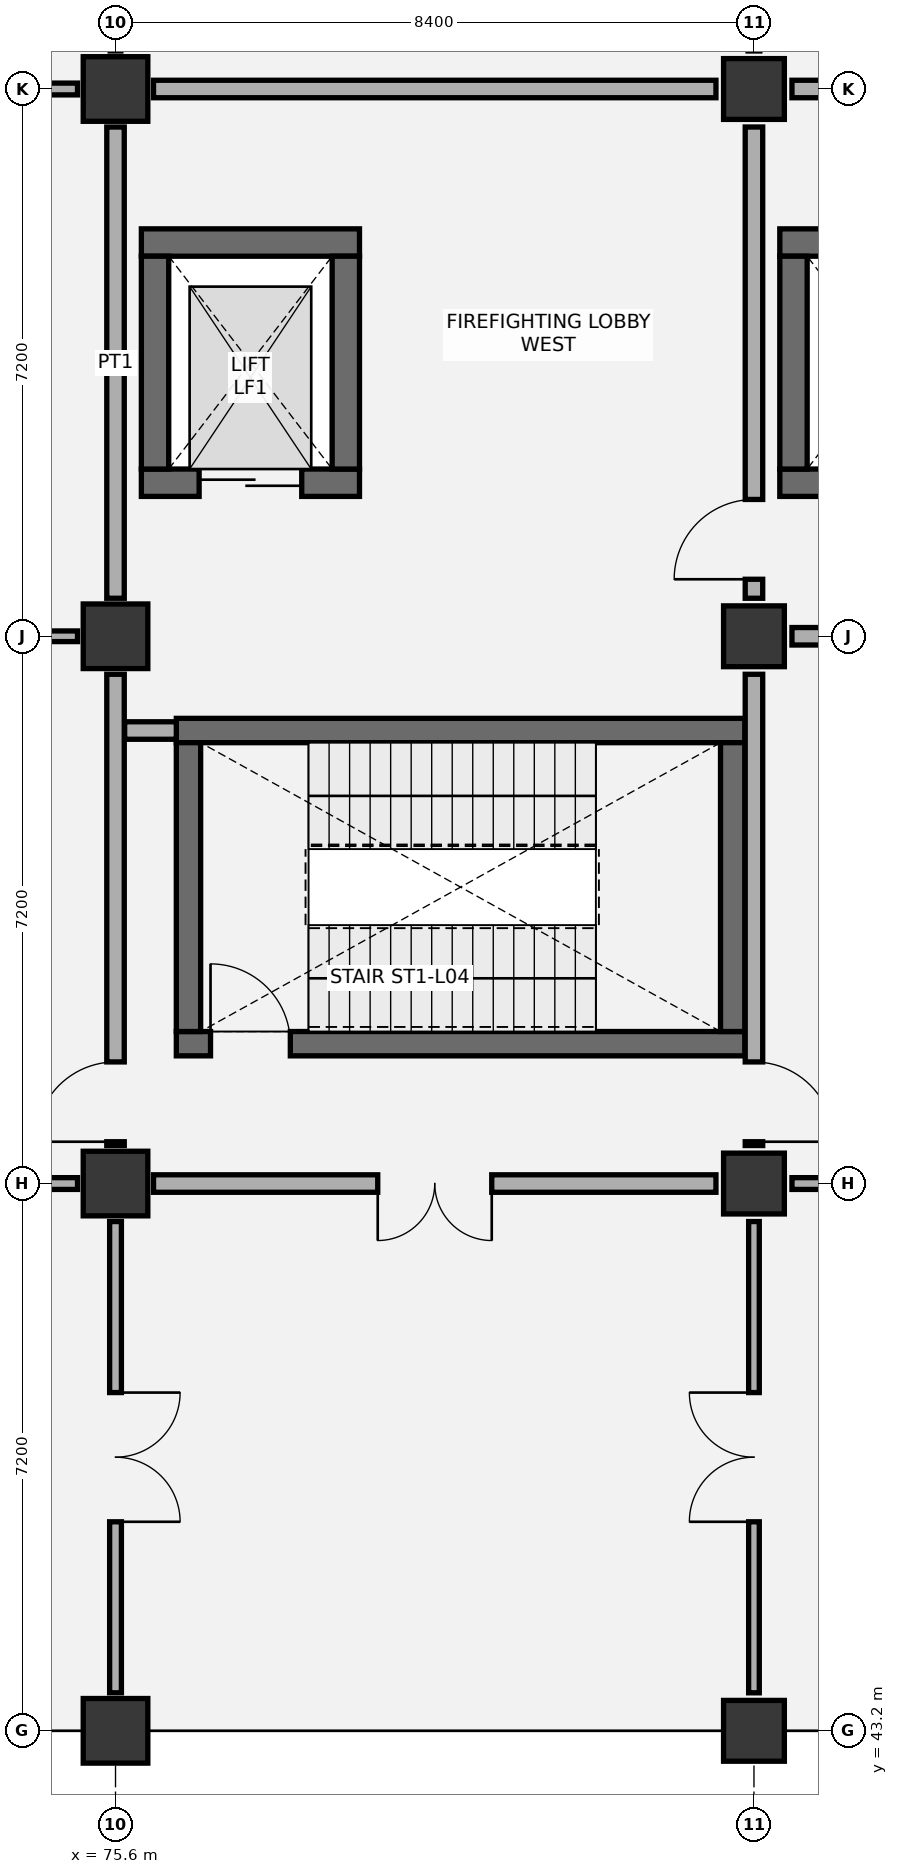
"""IFC4 building model, lengths in metres.
Left out: names, types, materials, properties, quantities, classifications, styles, units other than length and angle.
Written with IfcOpenShell. Run it as: python <this file> out.ifc"""

import sys

from ifc_helpers import new_model, si_unit, direction, frame, frame_2d, origin, origin_2d, place, context, subcontext, project, spatial, rectangle, extrude, element, fill, save


model = new_model("IFC4")
c1 = context("Model", 3, precision=1e-05, world=origin(), true_north=direction((0.0, 1.0)))
c2 = subcontext(c1, "Body", "Model", "MODEL_VIEW")
j1 = project(units=[si_unit("LENGTHUNIT", "METRE"), si_unit("PLANEANGLEUNIT", "RADIAN")], contexts=[c1])
p1 = place(None, origin())
s1 = spatial("IfcSite", under=j1, at=p1, CompositionType="ELEMENT")
p2 = place(p1, origin())
s2 = spatial("IfcBuilding", under=s1, at=p2, CompositionType="ELEMENT")
p3 = place(p2, frame((0.0, 0.0, 22.2)))
s3 = spatial("IfcBuildingStorey", under=s2, at=p3, CompositionType="ELEMENT", Elevation=22.2)
for number, where, z_axis, x_axis in (
    (1, (75.6, 43.2, 0.0), (0.0, 0.0, 1.0), (1.0, 0.0, 0.0)),
    (2, (75.6, 50.4, 0.0), (0.0, 0.0, 1.0), (1.0, 0.0, 0.0)),
    (3, (75.6, 57.6, 0.0), (0.0, 0.0, 1.0), (1.0, 0.0, 0.0)),
    (4, (75.6, 64.8, 0.0), (0.0, 0.0, 1.0), (1.0, 0.0, 0.0)),
):
    element("IfcColumn", number, at=place(p3, frame(where, z_axis=z_axis, x_axis=x_axis)), inside=s3, PredefinedType="COLUMN", context=c2, shape_type="SweptSolid", body=[
        extrude(rectangle(XDim=0.85, YDim=0.85, at=origin_2d()), origin(), (0.0, 0.0, 1.0), 4.8),
    ])
for number, where, z_axis, x_axis in (
    (5, (84.0, 43.2, 0.0), (0.0, 0.0, 1.0), (1.0, 0.0, 0.0)),
    (6, (84.0, 50.4, 0.0), (0.0, 0.0, 1.0), (1.0, 0.0, 0.0)),
    (7, (84.0, 57.6, 0.0), (0.0, 0.0, 1.0), (1.0, 0.0, 0.0)),
    (8, (84.0, 64.8, 0.0), (0.0, 0.0, 1.0), (1.0, 0.0, 0.0)),
):
    element("IfcColumn", number, at=place(p3, frame(where, z_axis=z_axis, x_axis=x_axis)), inside=s3, PredefinedType="COLUMN", context=c2, shape_type="SweptSolid", body=[
        extrude(rectangle(XDim=0.8, YDim=0.8, at=origin_2d()), origin(), (0.0, 0.0, 1.0), 4.8),
    ])
p4 = place(p3, frame((76.4, 52.24, 0.0), z_axis=(0.0, 0.0, 1.0), x_axis=(1.0, 0.0, 0.0)))
e9 = element("IfcWall", 9, at=p4, inside=s3, PredefinedType="SHEAR", context=c2, shape_type="SweptSolid", body=[
    extrude(rectangle(XDim=7.48, YDim=0.32, at=frame_2d((3.74, 0.0))), origin(), (0.0, 0.0, 1.0), 4.52),
])
p5 = place(p4, frame((0.45, 0.0, 0.0)))
e10 = element("IfcOpeningElement", 10, at=p5, cuts=e9, PredefinedType="OPENING", context=c2, shape_type="SweptSolid", body=[
    extrude(rectangle(XDim=1.05, YDim=2.15, at=frame_2d((0.525, 1.075))), frame((0.0, 0.17, 0.0), z_axis=(0.0, -1.0, 0.0), x_axis=(1.0, 0.0, 0.0)), (0.0, 0.0, 1.0), 0.34),
])
p6 = place(p3, frame((76.4, 56.36, 0.0), z_axis=(0.0, 0.0, 1.0), x_axis=(1.0, 0.0, 0.0)))
e11 = element("IfcWall", 11, at=p6, inside=s3, PredefinedType="SHEAR", context=c2, shape_type="SweptSolid", body=[
    extrude(rectangle(XDim=7.48, YDim=0.32, at=frame_2d((3.74, 0.0))), origin(), (0.0, 0.0, 1.0), 4.52),
])
for number, where, z_axis, x_axis in (
    (12, (76.56, 52.4, 0.0), (0.0, 0.0, 1.0), (0.0, 1.0, 0.0)),
    (13, (83.72, 52.4, 0.0), (0.0, 0.0, 1.0), (0.0, 1.0, 0.0)),
):
    element("IfcWall", number, at=place(p3, frame(where, z_axis=z_axis, x_axis=x_axis)), inside=s3, PredefinedType="SHEAR", context=c2, shape_type="SweptSolid", body=[
        extrude(rectangle(XDim=3.8, YDim=0.32, at=frame_2d((1.9, 0.0))), origin(), (0.0, 0.0, 1.0), 4.52),
    ])
p7 = place(p3, frame((75.94, 62.78, 0.0), z_axis=(0.0, 0.0, 1.0), x_axis=(1.0, 0.0, 0.0)))
e14 = element("IfcWall", 14, at=p7, inside=s3, PredefinedType="SHEAR", context=c2, shape_type="SweptSolid", body=[
    extrude(rectangle(XDim=2.87, YDim=0.36, at=frame_2d((1.435, 0.0))), origin(), (0.0, 0.0, 1.0), 4.52),
])
p8 = place(p3, frame((75.94, 59.62, 0.0), z_axis=(0.0, 0.0, 1.0), x_axis=(1.0, 0.0, 0.0)))
e15 = element("IfcWall", 15, at=p8, inside=s3, PredefinedType="SHEAR", context=c2, shape_type="SweptSolid", body=[
    extrude(rectangle(XDim=2.87, YDim=0.36, at=frame_2d((1.435, 0.0))), origin(), (0.0, 0.0, 1.0), 4.52),
])
p9 = place(p8, frame((0.76, 0.0, 0.0)))
e16 = element("IfcOpeningElement", 16, at=p9, cuts=e15, PredefinedType="OPENING", context=c2, shape_type="SweptSolid", body=[
    extrude(rectangle(XDim=1.35, YDim=2.2, at=frame_2d((0.675, 1.1))), frame((0.0, 0.19, 0.0), z_axis=(0.0, -1.0, 0.0), x_axis=(1.0, 0.0, 0.0)), (0.0, 0.0, 1.0), 0.38),
])
for number, where, z_axis, x_axis in (
    (17, (76.12, 59.8, 0.0), (0.0, 0.0, 1.0), (0.0, 1.0, 0.0)),
    (18, (78.63, 59.8, 0.0), (0.0, 0.0, 1.0), (0.0, 1.0, 0.0)),
):
    element("IfcWall", number, at=place(p3, frame(where, z_axis=z_axis, x_axis=x_axis)), inside=s3, PredefinedType="SHEAR", context=c2, shape_type="SweptSolid", body=[
        extrude(rectangle(XDim=2.8, YDim=0.36, at=frame_2d((1.4, 0.0))), origin(), (0.0, 0.0, 1.0), 4.52),
    ])
p10 = place(p3, frame((84.34, 62.78, 0.0), z_axis=(0.0, 0.0, 1.0), x_axis=(1.0, 0.0, 0.0)))
e19 = element("IfcWall", 19, at=p10, inside=s3, PredefinedType="SHEAR", context=c2, shape_type="SweptSolid", body=[
    extrude(rectangle(XDim=7.77, YDim=0.36, at=frame_2d((3.885, 0.0))), origin(), (0.0, 0.0, 1.0), 4.52),
])
p11 = place(p3, frame((84.34, 59.62, 0.0), z_axis=(0.0, 0.0, 1.0), x_axis=(1.0, 0.0, 0.0)))
e20 = element("IfcWall", 20, at=p11, inside=s3, PredefinedType="SHEAR", context=c2, shape_type="SweptSolid", body=[
    extrude(rectangle(XDim=2.66, YDim=0.36, at=frame_2d((1.33, 0.0))), origin(), (0.0, 0.0, 1.0), 4.52),
])
p12 = place(p11, frame((0.78, 0.0, 0.0)))
e21 = element("IfcOpeningElement", 21, at=p12, cuts=e20, PredefinedType="OPENING", context=c2, shape_type="SweptSolid", body=[
    extrude(rectangle(XDim=1.1, YDim=2.15, at=frame_2d((0.55, 1.075))), frame((0.0, 0.19, 0.0), z_axis=(0.0, -1.0, 0.0), x_axis=(1.0, 0.0, 0.0)), (0.0, 0.0, 1.0), 0.38),
])
p13 = place(p3, frame((84.52, 59.8, 0.0), z_axis=(0.0, 0.0, 1.0), x_axis=(0.0, 1.0, 0.0)))
e22 = element("IfcWall", 22, at=p13, inside=s3, PredefinedType="SHEAR", context=c2, shape_type="SweptSolid", body=[
    extrude(rectangle(XDim=2.8, YDim=0.36, at=frame_2d((1.4, 0.0))), origin(), (0.0, 0.0, 1.0), 4.52),
])
p14 = place(p3, frame((75.6, 43.7, 0.0), z_axis=(0.0, 0.0, 1.0), x_axis=(0.0, 1.0, 0.0)))
e23 = element("IfcWall", 23, at=p14, inside=s3, PredefinedType="PARTITIONING", context=c2, shape_type="SweptSolid", body=[
    extrude(rectangle(XDim=6.2, YDim=0.155, at=frame_2d((3.1, 0.0))), origin(), (0.0, 0.0, 1.0), 3.865),
])
p15 = place(p14, frame((2.25, 0.0, 0.0)))
e24 = element("IfcOpeningElement", 24, at=p15, cuts=e23, PredefinedType="OPENING", context=c2, shape_type="SweptSolid", body=[
    extrude(rectangle(XDim=1.7, YDim=2.25, at=frame_2d((0.85, 1.125))), frame((0.0, 0.087, 0.0), z_axis=(0.0, -1.0, 0.0), x_axis=(1.0, 0.0, 0.0)), (0.0, 0.0, 1.0), 0.175),
])
p16 = place(p3, frame((67.7, 50.4, 0.0), z_axis=(0.0, 0.0, 1.0), x_axis=(1.0, 0.0, 0.0)))
e25 = element("IfcWall", 25, at=p16, inside=s3, PredefinedType="PARTITIONING", context=c2, shape_type="SweptSolid", body=[
    extrude(rectangle(XDim=7.4, YDim=0.155, at=frame_2d((3.7, 0.0))), origin(), (0.0, 0.0, 1.0), 3.815),
])
p17 = place(p16, frame((3.0, 0.0, 0.0)))
e26 = element("IfcOpeningElement", 26, at=p17, cuts=e25, PredefinedType="OPENING", context=c2, shape_type="SweptSolid", body=[
    extrude(rectangle(XDim=1.4, YDim=2.15, at=frame_2d((0.7, 1.075))), frame((0.0, 0.087, 0.0), z_axis=(0.0, -1.0, 0.0), x_axis=(1.0, 0.0, 0.0)), (0.0, 0.0, 1.0), 0.175),
])
p18 = place(p3, frame((75.6, 50.9, 0.0), z_axis=(0.0, 0.0, 1.0), x_axis=(0.0, 1.0, 0.0)))
e27 = element("IfcWall", 27, at=p18, inside=s3, PredefinedType="PARTITIONING", context=c2, shape_type="SweptSolid", body=[
    extrude(rectangle(XDim=6.2, YDim=0.23, at=frame_2d((3.1, 0.0))), origin(), (0.0, 0.0, 1.0), 4.225),
])
p19 = place(p18, frame((0.05, 0.0, 0.0)))
e28 = element("IfcOpeningElement", 28, at=p19, cuts=e27, PredefinedType="OPENING", context=c2, shape_type="SweptSolid", body=[
    extrude(rectangle(XDim=1.05, YDim=2.15, at=frame_2d((0.525, 1.075))), frame((0.0, 0.125, 0.0), z_axis=(0.0, -1.0, 0.0), x_axis=(1.0, 0.0, 0.0)), (0.0, 0.0, 1.0), 0.25),
])
p20 = place(p3, frame((67.7, 57.6, 0.0), z_axis=(0.0, 0.0, 1.0), x_axis=(1.0, 0.0, 0.0)))
e29 = element("IfcWall", 29, at=p20, inside=s3, PredefinedType="PARTITIONING", context=c2, shape_type="SweptSolid", body=[
    extrude(rectangle(XDim=7.4, YDim=0.14, at=frame_2d((3.7, 0.0))), origin(), (0.0, 0.0, 1.0), 3.815),
])
p21 = place(p20, frame((3.0, 0.0, 0.0)))
e30 = element("IfcOpeningElement", 30, at=p21, cuts=e29, PredefinedType="OPENING", context=c2, shape_type="SweptSolid", body=[
    extrude(rectangle(XDim=1.4, YDim=2.15, at=frame_2d((0.7, 1.075))), frame((0.0, 0.08, 0.0), z_axis=(0.0, -1.0, 0.0), x_axis=(1.0, 0.0, 0.0)), (0.0, 0.0, 1.0), 0.16),
])
p22 = place(p3, frame((75.6, 58.1, 0.0), z_axis=(0.0, 0.0, 1.0), x_axis=(0.0, 1.0, 0.0)))
e31 = element("IfcWall", 31, at=p22, inside=s3, PredefinedType="PARTITIONING", context=c2, shape_type="SweptSolid", body=[
    extrude(rectangle(XDim=6.2, YDim=0.23, at=frame_2d((3.1, 0.0))), origin(), (0.0, 0.0, 1.0), 3.865),
])
p23 = place(p3, frame((67.7, 64.8, 0.0), z_axis=(0.0, 0.0, 1.0), x_axis=(1.0, 0.0, 0.0)))
e32 = element("IfcWall", 32, at=p23, inside=s3, PredefinedType="PARTITIONING", context=c2, shape_type="SweptSolid", body=[
    extrude(rectangle(XDim=7.4, YDim=0.155, at=frame_2d((3.7, 0.0))), origin(), (0.0, 0.0, 1.0), 3.815),
])
p24 = place(p23, frame((2.85, 0.0, 0.0)))
e33 = element("IfcOpeningElement", 33, at=p24, cuts=e32, PredefinedType="OPENING", context=c2, shape_type="SweptSolid", body=[
    extrude(rectangle(XDim=1.7, YDim=2.25, at=frame_2d((0.85, 1.125))), frame((0.0, 0.087, 0.0), z_axis=(0.0, -1.0, 0.0), x_axis=(1.0, 0.0, 0.0)), (0.0, 0.0, 1.0), 0.175),
])
p25 = place(p3, frame((84.0, 43.7, 0.0), z_axis=(0.0, 0.0, 1.0), x_axis=(0.0, 1.0, 0.0)))
e34 = element("IfcWall", 34, at=p25, inside=s3, PredefinedType="PARTITIONING", context=c2, shape_type="SweptSolid", body=[
    extrude(rectangle(XDim=6.2, YDim=0.14, at=frame_2d((3.1, 0.0))), origin(), (0.0, 0.0, 1.0), 4.225),
])
p26 = place(p25, frame((2.25, 0.0, 0.0)))
e35 = element("IfcOpeningElement", 35, at=p26, cuts=e34, PredefinedType="OPENING", context=c2, shape_type="SweptSolid", body=[
    extrude(rectangle(XDim=1.7, YDim=2.25, at=frame_2d((0.85, 1.125))), frame((0.0, 0.08, 0.0), z_axis=(0.0, -1.0, 0.0), x_axis=(1.0, 0.0, 0.0)), (0.0, 0.0, 1.0), 0.16),
])
p27 = place(p3, frame((76.1, 50.4, 0.0), z_axis=(0.0, 0.0, 1.0), x_axis=(1.0, 0.0, 0.0)))
e36 = element("IfcWall", 36, at=p27, inside=s3, PredefinedType="PARTITIONING", context=c2, shape_type="SweptSolid", body=[
    extrude(rectangle(XDim=7.4, YDim=0.23, at=frame_2d((3.7, 0.0))), origin(), (0.0, 0.0, 1.0), 3.815),
])
p28 = place(p27, frame((2.95, 0.0, 0.0)))
e37 = element("IfcOpeningElement", 37, at=p28, cuts=e36, PredefinedType="OPENING", context=c2, shape_type="SweptSolid", body=[
    extrude(rectangle(XDim=1.5, YDim=2.15, at=frame_2d((0.75, 1.075))), frame((0.0, 0.125, 0.0), z_axis=(0.0, -1.0, 0.0), x_axis=(1.0, 0.0, 0.0)), (0.0, 0.0, 1.0), 0.25),
])
p29 = place(p3, frame((84.0, 50.9, 0.0), z_axis=(0.0, 0.0, 1.0), x_axis=(0.0, 1.0, 0.0)))
e38 = element("IfcWall", 38, at=p29, inside=s3, PredefinedType="PARTITIONING", context=c2, shape_type="SweptSolid", body=[
    extrude(rectangle(XDim=6.2, YDim=0.23, at=frame_2d((3.1, 0.0))), origin(), (0.0, 0.0, 1.0), 3.865),
])
p30 = place(p29, frame((0.05, 0.0, 0.0)))
e39 = element("IfcOpeningElement", 39, at=p30, cuts=e38, PredefinedType="OPENING", context=c2, shape_type="SweptSolid", body=[
    extrude(rectangle(XDim=1.05, YDim=2.15, at=frame_2d((0.525, 1.075))), frame((0.0, 0.125, 0.0), z_axis=(0.0, -1.0, 0.0), x_axis=(1.0, 0.0, 0.0)), (0.0, 0.0, 1.0), 0.25),
])
p31 = place(p3, frame((75.72, 56.36, 0.0), z_axis=(0.0, 0.0, 1.0), x_axis=(1.0, 0.0, 0.0)))
e40 = element("IfcWall", 40, at=p31, inside=s3, PredefinedType="PARTITIONING", context=c2, shape_type="SweptSolid", body=[
    extrude(rectangle(XDim=0.68, YDim=0.23, at=frame_2d((0.34, 0.0))), origin(), (0.0, 0.0, 1.0), 4.52),
])
p32 = place(p3, frame((84.0, 58.1, 0.0), z_axis=(0.0, 0.0, 1.0), x_axis=(0.0, 1.0, 0.0)))
e41 = element("IfcWall", 41, at=p32, inside=s3, PredefinedType="PARTITIONING", context=c2, shape_type="SweptSolid", body=[
    extrude(rectangle(XDim=6.2, YDim=0.23, at=frame_2d((3.1, 0.0))), origin(), (0.0, 0.0, 1.0), 4.015),
])
p33 = place(p32, frame((0.25, 0.0, 0.0)))
e42 = element("IfcOpeningElement", 42, at=p33, cuts=e41, PredefinedType="OPENING", context=c2, shape_type="SweptSolid", body=[
    extrude(rectangle(XDim=1.05, YDim=2.15, at=frame_2d((0.525, 1.075))), frame((0.0, 0.125, 0.0), z_axis=(0.0, -1.0, 0.0), x_axis=(1.0, 0.0, 0.0)), (0.0, 0.0, 1.0), 0.25),
])
p34 = place(p3, frame((76.1, 64.8, 0.0), z_axis=(0.0, 0.0, 1.0), x_axis=(1.0, 0.0, 0.0)))
e43 = element("IfcWall", 43, at=p34, inside=s3, PredefinedType="PARTITIONING", context=c2, shape_type="SweptSolid", body=[
    extrude(rectangle(XDim=7.4, YDim=0.23, at=frame_2d((3.7, 0.0))), origin(), (0.0, 0.0, 1.0), 3.815),
])
p35 = place(p3, frame((84.5, 50.4, 0.0), z_axis=(0.0, 0.0, 1.0), x_axis=(1.0, 0.0, 0.0)))
e44 = element("IfcWall", 44, at=p35, inside=s3, PredefinedType="PARTITIONING", context=c2, shape_type="SweptSolid", body=[
    extrude(rectangle(XDim=7.4, YDim=0.155, at=frame_2d((3.7, 0.0))), origin(), (0.0, 0.0, 1.0), 3.815),
])
p36 = place(p35, frame((2.85, 0.0, 0.0)))
e45 = element("IfcOpeningElement", 45, at=p36, cuts=e44, PredefinedType="OPENING", context=c2, shape_type="SweptSolid", body=[
    extrude(rectangle(XDim=1.7, YDim=2.25, at=frame_2d((0.85, 1.125))), frame((0.0, 0.087, 0.0), z_axis=(0.0, -1.0, 0.0), x_axis=(1.0, 0.0, 0.0)), (0.0, 0.0, 1.0), 0.175),
])
p37 = place(p3, frame((84.5, 57.6, 0.0), z_axis=(0.0, 0.0, 1.0), x_axis=(1.0, 0.0, 0.0)))
e46 = element("IfcWall", 46, at=p37, inside=s3, PredefinedType="PARTITIONING", context=c2, shape_type="SweptSolid", body=[
    extrude(rectangle(XDim=7.4, YDim=0.23, at=frame_2d((3.7, 0.0))), origin(), (0.0, 0.0, 1.0), 3.815),
])
p38 = place(p37, frame((2.95, 0.0, 0.0)))
e47 = element("IfcOpeningElement", 47, at=p38, cuts=e46, PredefinedType="OPENING", context=c2, shape_type="SweptSolid", body=[
    extrude(rectangle(XDim=1.5, YDim=2.15, at=frame_2d((0.75, 1.075))), frame((0.0, 0.125, 0.0), z_axis=(0.0, -1.0, 0.0), x_axis=(1.0, 0.0, 0.0)), (0.0, 0.0, 1.0), 0.25),
])
p39 = place(p3, frame((84.5, 64.8, 0.0), z_axis=(0.0, 0.0, 1.0), x_axis=(1.0, 0.0, 0.0)))
e48 = element("IfcWall", 48, at=p39, inside=s3, PredefinedType="PARTITIONING", context=c2, shape_type="SweptSolid", body=[
    extrude(rectangle(XDim=7.4, YDim=0.23, at=frame_2d((3.7, 0.0))), origin(), (0.0, 0.0, 1.0), 3.815),
])
p40 = place(p5, origin())
e49 = element("IfcDoor", 49, at=p40, inside=s3, OperationType="SINGLE_SWING_LEFT", PredefinedType="DOOR", context=c2, shape_type="SweptSolid", body=[
    extrude(rectangle(XDim=1.05, YDim=2.15, at=frame_2d((0.525, 1.075))), frame((0.0, 0.025, 0.0), z_axis=(0.0, -1.0, 0.0), x_axis=(1.0, 0.0, 0.0)), (0.0, 0.0, 1.0), 0.05),
])
fill(e10, e49)
p41 = place(p9, origin())
e50 = element("IfcDoor", 50, at=p41, inside=s3, OperationType="DOUBLE_DOOR_SLIDING", PredefinedType="DOOR", context=c2, shape_type="SweptSolid", body=[
    extrude(rectangle(XDim=1.35, YDim=2.2, at=frame_2d((0.675, 1.1))), frame((0.0, 0.025, 0.0), z_axis=(0.0, -1.0, 0.0), x_axis=(1.0, 0.0, 0.0)), (0.0, 0.0, 1.0), 0.05),
])
fill(e16, e50)
p42 = place(p15, frame((1.7, 0.0, 0.0), z_axis=(0.0, 0.0, 1.0), x_axis=(-1.0, 0.0, 0.0)))
e51 = element("IfcDoor", 51, at=p42, inside=s3, OperationType="DOUBLE_DOOR_SINGLE_SWING", PredefinedType="DOOR", context=c2, shape_type="SweptSolid", body=[
    extrude(rectangle(XDim=1.7, YDim=2.25, at=frame_2d((0.85, 1.125))), frame((0.0, 0.025, 0.0), z_axis=(0.0, -1.0, 0.0), x_axis=(1.0, 0.0, 0.0)), (0.0, 0.0, 1.0), 0.05),
])
fill(e24, e51)
p43 = place(p19, origin())
e52 = element("IfcDoor", 52, at=p43, inside=s3, OperationType="SINGLE_SWING_LEFT", PredefinedType="DOOR", context=c2, shape_type="SweptSolid", body=[
    extrude(rectangle(XDim=1.05, YDim=2.15, at=frame_2d((0.525, 1.075))), frame((0.0, 0.025, 0.0), z_axis=(0.0, -1.0, 0.0), x_axis=(1.0, 0.0, 0.0)), (0.0, 0.0, 1.0), 0.05),
])
fill(e28, e52)
p44 = place(p26, origin())
e53 = element("IfcDoor", 53, at=p44, inside=s3, OperationType="DOUBLE_DOOR_SINGLE_SWING", PredefinedType="DOOR", context=c2, shape_type="SweptSolid", body=[
    extrude(rectangle(XDim=1.7, YDim=2.25, at=frame_2d((0.85, 1.125))), frame((0.0, 0.025, 0.0), z_axis=(0.0, -1.0, 0.0), x_axis=(1.0, 0.0, 0.0)), (0.0, 0.0, 1.0), 0.05),
])
fill(e35, e53)
p45 = place(p28, frame((1.5, 0.0, 0.0), z_axis=(0.0, 0.0, 1.0), x_axis=(-1.0, 0.0, 0.0)))
e54 = element("IfcDoor", 54, at=p45, inside=s3, OperationType="DOUBLE_DOOR_SINGLE_SWING", PredefinedType="DOOR", context=c2, shape_type="SweptSolid", body=[
    extrude(rectangle(XDim=1.5, YDim=2.15, at=frame_2d((0.75, 1.075))), frame((0.0, 0.025, 0.0), z_axis=(0.0, -1.0, 0.0), x_axis=(1.0, 0.0, 0.0)), (0.0, 0.0, 1.0), 0.05),
])
fill(e37, e54)
p46 = place(p30, frame((1.05, 0.0, 0.0), z_axis=(0.0, 0.0, 1.0), x_axis=(-1.0, 0.0, 0.0)))
e55 = element("IfcDoor", 55, at=p46, inside=s3, OperationType="SINGLE_SWING_RIGHT", PredefinedType="DOOR", context=c2, shape_type="SweptSolid", body=[
    extrude(rectangle(XDim=1.05, YDim=2.15, at=frame_2d((0.525, 1.075))), frame((0.0, 0.025, 0.0), z_axis=(0.0, -1.0, 0.0), x_axis=(1.0, 0.0, 0.0)), (0.0, 0.0, 1.0), 0.05),
])
fill(e39, e55)
p47 = place(p33, origin())
e56 = element("IfcDoor", 56, at=p47, inside=s3, OperationType="SINGLE_SWING_LEFT", PredefinedType="DOOR", context=c2, shape_type="SweptSolid", body=[
    extrude(rectangle(XDim=1.05, YDim=2.15, at=frame_2d((0.525, 1.075))), frame((0.0, 0.025, 0.0), z_axis=(0.0, -1.0, 0.0), x_axis=(1.0, 0.0, 0.0)), (0.0, 0.0, 1.0), 0.05),
])
fill(e42, e56)
save(model, sys.argv[1])
